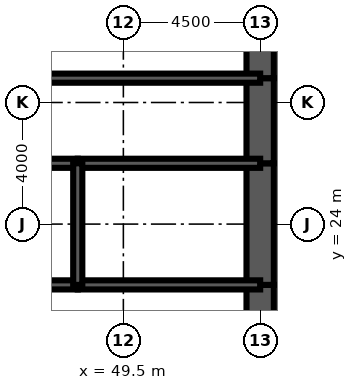
"""IFC4 building model, lengths in metres.
Left out: names, types, materials, properties, quantities, classifications, styles, units other than length and angle.
Written with IfcOpenShell. Run it as: python <this file> out.ifc"""

import sys

from ifc_helpers import new_model, si_unit, direction, frame, frame_2d, origin, place, context, subcontext, project, spatial, rectangle, extrude, element, fill, save


model = new_model("IFC4")
c1 = context("Model", 3, precision=1e-05, world=origin(), true_north=direction((0.0, 1.0)))
c2 = subcontext(c1, "Body", "Model", "MODEL_VIEW")
j1 = project(units=[si_unit("LENGTHUNIT", "METRE"), si_unit("PLANEANGLEUNIT", "RADIAN")], contexts=[c1])
p1 = place(None, origin())
s1 = spatial("IfcSite", under=j1, at=p1, CompositionType="ELEMENT")
p2 = place(p1, origin())
s2 = spatial("IfcBuilding", under=s1, at=p2, CompositionType="ELEMENT")
p3 = place(p2, frame((0.0, 0.0, 54.5)))
s3 = spatial("IfcBuildingStorey", under=s2, at=p3, CompositionType="ELEMENT", Elevation=54.5)
p4 = place(p3, frame((54.0, 19.2, 0.0), z_axis=(0.0, 0.0, 1.0), x_axis=(0.0, 1.0, 0.0)))
e1 = element("IfcWall", 1, at=p4, inside=s3, PredefinedType="SHEAR", context=c2, shape_type="SweptSolid", body=[
    extrude(rectangle(XDim=2.8, YDim=0.9, at=frame_2d((1.4, 0.0))), origin(), (0.0, 0.0, 1.0), 4.5),
])
p5 = place(p4, frame((0.4, 0.0, 0.0)))
e2 = element("IfcOpeningElement", 2, at=p5, cuts=e1, PredefinedType="OPENING", context=c2, shape_type="SweptSolid", body=[
    extrude(rectangle(XDim=1.8, YDim=2.1, at=frame_2d((0.9, 1.05))), frame((0.0, 0.46, 0.0), z_axis=(0.0, -1.0, 0.0), x_axis=(1.0, 0.0, 0.0)), (0.0, 0.0, 1.0), 0.92),
])
p6 = place(p3, frame((54.0, 22.0, 0.0), z_axis=(0.0, 0.0, 1.0), x_axis=(0.0, 1.0, 0.0)))
e3 = element("IfcWall", 3, at=p6, inside=s3, PredefinedType="SHEAR", context=c2, shape_type="SweptSolid", body=[
    extrude(rectangle(XDim=4.0, YDim=0.9, at=frame_2d((2.0, 0.0))), origin(), (0.0, 0.0, 1.0), 4.5),
])
p7 = place(p3, frame((54.0, 26.0, 0.0), z_axis=(0.0, 0.0, 1.0), x_axis=(0.0, 1.0, 0.0)))
e4 = element("IfcWall", 4, at=p7, inside=s3, PredefinedType="SHEAR", context=c2, shape_type="SweptSolid", body=[
    extrude(rectangle(XDim=2.8, YDim=0.9, at=frame_2d((1.4, 0.0))), origin(), (0.0, 0.0, 1.0), 4.5),
])
p8 = place(p7, frame((0.6, 0.0, 0.0)))
e5 = element("IfcOpeningElement", 5, at=p8, cuts=e4, PredefinedType="OPENING", context=c2, shape_type="SweptSolid", body=[
    extrude(rectangle(XDim=1.8, YDim=2.1, at=frame_2d((0.9, 1.05))), frame((0.0, 0.46, 0.0), z_axis=(0.0, -1.0, 0.0), x_axis=(1.0, 0.0, 0.0)), (0.0, 0.0, 1.0), 0.92),
])
p9 = place(p3, frame((54.0, 28.8, 0.0), z_axis=(0.0, 0.0, 1.0), x_axis=(0.0, 1.0, 0.0)))
e6 = element("IfcWall", 6, at=p9, inside=s3, PredefinedType="SHEAR", context=c2, shape_type="SweptSolid", body=[
    extrude(rectangle(XDim=3.2, YDim=0.9, at=frame_2d((1.6, 0.0))), origin(), (0.0, 0.0, 1.0), 4.5),
])
p10 = place(p3, frame((45.0, 28.8, 0.0), z_axis=(0.0, 0.0, 1.0), x_axis=(1.0, 0.0, 0.0)))
e7 = element("IfcWall", 7, at=p10, inside=s3, PredefinedType="SOLIDWALL", context=c2, shape_type="SweptSolid", body=[
    extrude(rectangle(XDim=9.0, YDim=0.3, at=frame_2d((4.5, 0.0))), origin(), (0.0, 0.0, 1.0), 4.5),
])
p11 = place(p10, frame((7.35, 0.0, 0.0)))
e8 = element("IfcOpeningElement", 8, at=p11, cuts=e7, PredefinedType="OPENING", context=c2, shape_type="SweptSolid", body=[
    extrude(rectangle(XDim=1.0, YDim=2.1, at=frame_2d((0.5, 1.05))), frame((0.0, 0.16, 0.0), z_axis=(0.0, -1.0, 0.0), x_axis=(1.0, 0.0, 0.0)), (0.0, 0.0, 1.0), 0.32),
])
p12 = place(p3, frame((45.0, 22.0, 0.0), z_axis=(0.0, 0.0, 1.0), x_axis=(1.0, 0.0, 0.0)))
e9 = element("IfcWall", 9, at=p12, inside=s3, PredefinedType="SOLIDWALL", context=c2, shape_type="SweptSolid", body=[
    extrude(rectangle(XDim=3.0, YDim=0.3, at=frame_2d((1.5, 0.0))), origin(), (0.0, 0.0, 1.0), 4.5),
])
p13 = place(p12, frame((1.0, 0.0, 0.0)))
e10 = element("IfcOpeningElement", 10, at=p13, cuts=e9, PredefinedType="OPENING", context=c2, shape_type="SweptSolid", body=[
    extrude(rectangle(XDim=1.0, YDim=2.1, at=frame_2d((0.5, 1.05))), frame((0.0, 0.16, 0.0), z_axis=(0.0, -1.0, 0.0), x_axis=(1.0, 0.0, 0.0)), (0.0, 0.0, 1.0), 0.32),
])
p14 = place(p3, frame((48.0, 22.0, 0.0), z_axis=(0.0, 0.0, 1.0), x_axis=(1.0, 0.0, 0.0)))
e11 = element("IfcWall", 11, at=p14, inside=s3, PredefinedType="SOLIDWALL", context=c2, shape_type="SweptSolid", body=[
    extrude(rectangle(XDim=6.0, YDim=0.3, at=frame_2d((3.0, 0.0))), origin(), (0.0, 0.0, 1.0), 4.5),
])
p15 = place(p14, frame((2.0, 0.0, 0.0)))
e12 = element("IfcOpeningElement", 12, at=p15, cuts=e11, PredefinedType="OPENING", context=c2, shape_type="SweptSolid", body=[
    extrude(rectangle(XDim=1.0, YDim=2.1, at=frame_2d((0.5, 1.05))), frame((0.0, 0.16, 0.0), z_axis=(0.0, -1.0, 0.0), x_axis=(1.0, 0.0, 0.0)), (0.0, 0.0, 1.0), 0.32),
])
p16 = place(p14, frame((4.3, 0.0, 0.0)))
e13 = element("IfcOpeningElement", 13, at=p16, cuts=e11, PredefinedType="OPENING", context=c2, shape_type="SweptSolid", body=[
    extrude(rectangle(XDim=1.0, YDim=2.1, at=frame_2d((0.5, 1.05))), frame((0.0, 0.16, 0.0), z_axis=(0.0, -1.0, 0.0), x_axis=(1.0, 0.0, 0.0)), (0.0, 0.0, 1.0), 0.32),
])
p17 = place(p3, frame((45.0, 26.0, 0.0), z_axis=(0.0, 0.0, 1.0), x_axis=(1.0, 0.0, 0.0)))
e14 = element("IfcWall", 14, at=p17, inside=s3, PredefinedType="SOLIDWALL", context=c2, shape_type="SweptSolid", body=[
    extrude(rectangle(XDim=3.0, YDim=0.3, at=frame_2d((1.5, 0.0))), origin(), (0.0, 0.0, 1.0), 4.5),
])
p18 = place(p3, frame((48.0, 26.0, 0.0), z_axis=(0.0, 0.0, 1.0), x_axis=(1.0, 0.0, 0.0)))
e15 = element("IfcWall", 15, at=p18, inside=s3, PredefinedType="SOLIDWALL", context=c2, shape_type="SweptSolid", body=[
    extrude(rectangle(XDim=6.0, YDim=0.3, at=frame_2d((3.0, 0.0))), origin(), (0.0, 0.0, 1.0), 4.5),
])
p19 = place(p3, frame((48.0, 22.0, 0.0), z_axis=(0.0, 0.0, 1.0), x_axis=(0.0, 1.0, 0.0)))
e16 = element("IfcWall", 16, at=p19, inside=s3, PredefinedType="SOLIDWALL", context=c2, shape_type="SweptSolid", body=[
    extrude(rectangle(XDim=4.0, YDim=0.3, at=frame_2d((2.0, 0.0))), origin(), (0.0, 0.0, 1.0), 4.5),
])
p20 = place(p3, frame((51.975, 22.15, 0.0), z_axis=(0.0, 0.0, 1.0), x_axis=(0.0, 1.0, 0.0)))
e17 = element("IfcWall", 17, at=p20, inside=s3, PredefinedType="PARTITIONING", context=c2, shape_type="SweptSolid", body=[
    extrude(rectangle(XDim=3.7, YDim=0.15, at=frame_2d((1.85, 0.0))), origin(), (0.0, 0.0, 1.0), 3.0),
])
p21 = place(p3, frame((49.2, 26.15, 0.0), z_axis=(0.0, 0.0, 1.0), x_axis=(0.0, 1.0, 0.0)))
e18 = element("IfcWall", 18, at=p21, inside=s3, PredefinedType="PARTITIONING", context=c2, shape_type="SweptSolid", body=[
    extrude(rectangle(XDim=2.5, YDim=0.15, at=frame_2d((1.25, 0.0))), origin(), (0.0, 0.0, 1.0), 3.0),
])
p22 = place(p21, frame((1.15, 0.0, 0.0)))
e19 = element("IfcOpeningElement", 19, at=p22, cuts=e18, PredefinedType="OPENING", context=c2, shape_type="SweptSolid", body=[
    extrude(rectangle(XDim=1.0, YDim=2.1, at=frame_2d((0.5, 1.05))), frame((0.0, 0.085, 0.0), z_axis=(0.0, -1.0, 0.0), x_axis=(1.0, 0.0, 0.0)), (0.0, 0.0, 1.0), 0.17),
])
p23 = place(p22, origin())
e20 = element("IfcDoor", 20, at=p23, inside=s3, OperationType="SINGLE_SWING_RIGHT", PredefinedType="DOOR", context=c2, shape_type="SweptSolid", body=[
    extrude(rectangle(XDim=1.0, YDim=2.1, at=frame_2d((0.5, 1.05))), frame((0.0, 0.025, 0.0), z_axis=(0.0, -1.0, 0.0), x_axis=(1.0, 0.0, 0.0)), (0.0, 0.0, 1.0), 0.05),
])
fill(e19, e20)
p24 = place(p11, origin())
e21 = element("IfcDoor", 21, at=p24, inside=s3, OperationType="SINGLE_SWING_RIGHT", PredefinedType="DOOR", context=c2, shape_type="SweptSolid", body=[
    extrude(rectangle(XDim=1.0, YDim=2.1, at=frame_2d((0.5, 1.05))), frame((0.0, 0.025, 0.0), z_axis=(0.0, -1.0, 0.0), x_axis=(1.0, 0.0, 0.0)), (0.0, 0.0, 1.0), 0.05),
])
fill(e8, e21)
p25 = place(p5, origin())
e22 = element("IfcDoor", 22, at=p25, inside=s3, OperationType="SINGLE_SWING_LEFT", PredefinedType="DOOR", context=c2, shape_type="SweptSolid", body=[
    extrude(rectangle(XDim=1.8, YDim=2.1, at=frame_2d((0.9, 1.05))), frame((0.0, 0.45, 0.0), z_axis=(0.0, -1.0, 0.0), x_axis=(1.0, 0.0, 0.0)), (0.0, 0.0, 1.0), 0.899),
])
fill(e2, e22)
p26 = place(p8, origin())
e23 = element("IfcDoor", 23, at=p26, inside=s3, OperationType="SINGLE_SWING_LEFT", PredefinedType="DOOR", context=c2, shape_type="SweptSolid", body=[
    extrude(rectangle(XDim=1.8, YDim=2.1, at=frame_2d((0.9, 1.05))), frame((0.0, 0.45, 0.0), z_axis=(0.0, -1.0, 0.0), x_axis=(1.0, 0.0, 0.0)), (0.0, 0.0, 1.0), 0.899),
])
fill(e5, e23)
p27 = place(p15, origin())
e24 = element("IfcDoor", 24, at=p27, inside=s3, OperationType="SINGLE_SWING_LEFT", PredefinedType="DOOR", context=c2, shape_type="SweptSolid", body=[
    extrude(rectangle(XDim=1.0, YDim=2.1, at=frame_2d((0.5, 1.05))), frame((0.0, 0.025, 0.0), z_axis=(0.0, -1.0, 0.0), x_axis=(1.0, 0.0, 0.0)), (0.0, 0.0, 1.0), 0.05),
])
fill(e12, e24)
p28 = place(p16, origin())
e25 = element("IfcDoor", 25, at=p28, inside=s3, OperationType="SINGLE_SWING_RIGHT", PredefinedType="DOOR", context=c2, shape_type="SweptSolid", body=[
    extrude(rectangle(XDim=1.0, YDim=2.1, at=frame_2d((0.5, 1.05))), frame((0.0, 0.025, 0.0), z_axis=(0.0, -1.0, 0.0), x_axis=(1.0, 0.0, 0.0)), (0.0, 0.0, 1.0), 0.05),
])
fill(e13, e25)
save(model, sys.argv[1])
